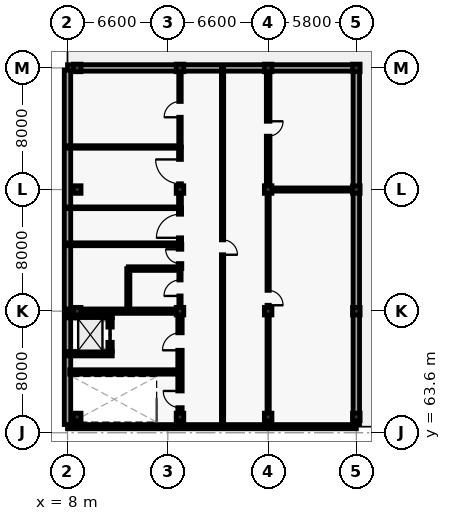
"""IFC4 building model, lengths in metres.
Left out: names, types, materials, properties, quantities, classifications, styles, units other than length and angle.
Written with IfcOpenShell. Run it as: python <this file> out.ifc"""

import sys

from ifc_helpers import new_model, si_unit, direction, frame, frame_2d, origin, origin_2d, place, context, subcontext, project, spatial, rectangle, extrude, element, fill, save


model = new_model("IFC4")
c1 = context("Model", 3, precision=1e-05, world=origin(), true_north=direction((0.0, 1.0)))
c2 = subcontext(c1, "Body", "Model", "MODEL_VIEW")
j1 = project(units=[si_unit("LENGTHUNIT", "METRE"), si_unit("PLANEANGLEUNIT", "RADIAN")], contexts=[c1])
p1 = place(None, origin())
s1 = spatial("IfcSite", under=j1, at=p1, CompositionType="ELEMENT")
p2 = place(p1, origin())
s2 = spatial("IfcBuilding", under=s1, at=p2, CompositionType="ELEMENT")
p3 = place(p2, frame((0.0, 0.0, 24.9)))
s3 = spatial("IfcBuildingStorey", under=s2, at=p3, CompositionType="ELEMENT", Elevation=24.9)
for number, where, z_axis, x_axis in (
    (1, (8.64, 64.64, 0.0), (0.0, 0.0, 1.0), (1.0, 0.0, 0.0)),
    (2, (8.64, 71.6, 0.0), (0.0, 0.0, 1.0), (1.0, 0.0, 0.0)),
    (3, (8.64, 79.6, 0.0), (0.0, 0.0, 1.0), (1.0, 0.0, 0.0)),
    (4, (8.64, 87.6, 0.0), (0.0, 0.0, 1.0), (1.0, 0.0, 0.0)),
    (5, (15.4, 64.64, 0.0), (0.0, 0.0, 1.0), (1.0, 0.0, 0.0)),
    (6, (15.4, 71.6, 0.0), (0.0, 0.0, 1.0), (1.0, 0.0, 0.0)),
    (7, (15.4, 79.6, 0.0), (0.0, 0.0, 1.0), (1.0, 0.0, 0.0)),
    (8, (15.4, 87.6, 0.0), (0.0, 0.0, 1.0), (1.0, 0.0, 0.0)),
    (9, (21.2, 64.64, 0.0), (0.0, 0.0, 1.0), (1.0, 0.0, 0.0)),
    (10, (21.2, 71.6, 0.0), (0.0, 0.0, 1.0), (1.0, 0.0, 0.0)),
    (11, (21.2, 79.6, 0.0), (0.0, 0.0, 1.0), (1.0, 0.0, 0.0)),
    (12, (21.2, 87.6, 0.0), (0.0, 0.0, 1.0), (1.0, 0.0, 0.0)),
    (13, (27.0, 64.64, 0.0), (0.0, 0.0, 1.0), (1.0, 0.0, 0.0)),
    (14, (27.0, 71.6, 0.0), (0.0, 0.0, 1.0), (1.0, 0.0, 0.0)),
    (15, (27.0, 79.6, 0.0), (0.0, 0.0, 1.0), (1.0, 0.0, 0.0)),
    (16, (27.0, 87.6, 0.0), (0.0, 0.0, 1.0), (1.0, 0.0, 0.0)),
):
    element("IfcColumn", number, at=place(p3, frame(where, z_axis=z_axis, x_axis=x_axis)), inside=s3, PredefinedType="COLUMN", context=c2, shape_type="SweptSolid", body=[
        extrude(rectangle(XDim=0.5, YDim=0.5, at=origin_2d()), origin(), (0.0, 0.0, 1.0), 4.5),
    ])
p4 = place(p3, frame((8.0, 87.6, 0.0), z_axis=(0.0, 0.0, 1.0), x_axis=(1.0, 0.0, 0.0)))
e17 = element("IfcWall", 17, at=p4, inside=s3, PredefinedType="SOLIDWALL", context=c2, shape_type="SweptSolid", body=[
    extrude(rectangle(XDim=19.0, YDim=0.425, at=frame_2d((9.5, 0.0))), origin(), (0.0, 0.0, 1.0), 3.605),
])
p5 = place(p3, frame((27.0, 87.46, 0.0), z_axis=(0.0, 0.0, 1.0), x_axis=(0.0, -1.0, 0.0)))
e18 = element("IfcWall", 18, at=p5, inside=s3, PredefinedType="SOLIDWALL", context=c2, shape_type="SweptSolid", body=[
    extrude(rectangle(XDim=23.32, YDim=0.425, at=frame_2d((11.66, 0.0))), origin(), (0.0, 0.0, 1.0), 3.405),
])
p6 = place(p3, frame((27.0, 64.0, 0.0), z_axis=(0.0, 0.0, 1.0), x_axis=(-1.0, 0.0, 0.0)))
e19 = element("IfcWall", 19, at=p6, inside=s3, PredefinedType="SOLIDWALL", context=c2, shape_type="SweptSolid", body=[
    extrude(rectangle(XDim=19.0, YDim=0.275, at=frame_2d((9.5, 0.0))), origin(), (0.0, 0.0, 1.0), 4.255),
])
p7 = place(p3, frame((8.0, 64.14, 0.0), z_axis=(0.0, 0.0, 1.0), x_axis=(0.0, 1.0, 0.0)))
e20 = element("IfcWall", 20, at=p7, inside=s3, PredefinedType="SOLIDWALL", context=c2, shape_type="SweptSolid", body=[
    extrude(rectangle(XDim=23.32, YDim=0.425, at=frame_2d((11.66, 0.0))), origin(), (0.0, 0.0, 1.0), 4.255),
])
p8 = place(p3, frame((7.855, 71.6, 0.0), z_axis=(0.0, 0.0, 1.0), x_axis=(1.0, 0.0, 0.0)))
e21 = element("IfcWall", 21, at=p8, inside=s3, PredefinedType="SHEAR", context=c2, shape_type="SweptSolid", body=[
    extrude(rectangle(XDim=7.293, YDim=0.29, at=frame_2d((3.646, 0.0))), origin(), (0.0, 0.0, 1.0), 4.255),
])
p9 = place(p3, frame((15.4, 64.145, 0.0), z_axis=(0.0, 0.0, 1.0), x_axis=(0.0, 1.0, 0.0)))
e22 = element("IfcWall", 22, at=p9, inside=s3, PredefinedType="SHEAR", context=c2, shape_type="SweptSolid", body=[
    extrude(rectangle(XDim=7.203, YDim=0.29, at=frame_2d((3.602, 0.0))), origin(), (0.0, 0.0, 1.0), 4.255),
])
p10 = place(p9, frame((1.105, 0.0, 0.0)))
e23 = element("IfcOpeningElement", 23, at=p10, cuts=e22, PredefinedType="OPENING", context=c2, shape_type="SweptSolid", body=[
    extrude(rectangle(XDim=1.1, YDim=2.15, at=frame_2d((0.55, 1.075))), frame((0.0, 0.155, 0.0), z_axis=(0.0, -1.0, 0.0), x_axis=(1.0, 0.0, 0.0)), (0.0, 0.0, 1.0), 0.31),
])
p11 = place(p9, frame((4.88, 0.0, 0.0)))
e24 = element("IfcOpeningElement", 24, at=p11, cuts=e22, PredefinedType="OPENING", context=c2, shape_type="SweptSolid", body=[
    extrude(rectangle(XDim=1.15, YDim=2.2, at=frame_2d((0.575, 1.1))), frame((0.0, 0.155, 0.0), z_axis=(0.0, -1.0, 0.0), x_axis=(1.0, 0.0, 0.0)), (0.0, 0.0, 1.0), 0.31),
])
p12 = place(p3, frame((8.145, 67.6, 0.0), z_axis=(0.0, 0.0, 1.0), x_axis=(1.0, 0.0, 0.0)))
e25 = element("IfcWall", 25, at=p12, inside=s3, PredefinedType="SHEAR", context=c2, shape_type="SweptSolid", body=[
    extrude(rectangle(XDim=7.11, YDim=0.29, at=frame_2d((3.555, 0.0))), origin(), (0.0, 0.0, 1.0), 4.255),
])
for number, where, z_axis, x_axis in (
    (26, (8.055, 68.8, 0.0), (0.0, 0.0, 1.0), (1.0, 0.0, 0.0)),
    (27, (8.055, 71.3, 0.0), (0.0, 0.0, 1.0), (1.0, 0.0, 0.0)),
):
    element("IfcWall", number, at=place(p3, frame(where, z_axis=z_axis, x_axis=x_axis)), inside=s3, PredefinedType="SHEAR", context=c2, shape_type="SweptSolid", body=[
        extrude(rectangle(XDim=2.89, YDim=0.29, at=frame_2d((1.445, 0.0))), origin(), (0.0, 0.0, 1.0), 4.255),
    ])
p13 = place(p3, frame((10.8, 68.945, 0.0), z_axis=(0.0, 0.0, 1.0), x_axis=(0.0, 1.0, 0.0)))
e28 = element("IfcWall", 28, at=p13, inside=s3, PredefinedType="SHEAR", context=c2, shape_type="SweptSolid", body=[
    extrude(rectangle(XDim=2.21, YDim=0.29, at=frame_2d((1.105, 0.0))), origin(), (0.0, 0.0, 1.0), 4.255),
])
p14 = place(p13, frame((0.605, 0.0, 0.0)))
e29 = element("IfcOpeningElement", 29, at=p14, cuts=e28, PredefinedType="OPENING", context=c2, shape_type="SweptSolid", body=[
    extrude(rectangle(XDim=1.0, YDim=2.15, at=frame_2d((0.5, 1.075))), frame((0.0, 0.155, 0.0), z_axis=(0.0, -1.0, 0.0), x_axis=(1.0, 0.0, 0.0)), (0.0, 0.0, 1.0), 0.31),
])
p15 = place(p3, frame((15.4, 71.852, 0.0), z_axis=(0.0, 0.0, 1.0), x_axis=(0.0, 1.0, 0.0)))
e30 = element("IfcWall", 30, at=p15, inside=s3, PredefinedType="PARTITIONING", context=c2, shape_type="SweptSolid", body=[
    extrude(rectangle(XDim=2.548, YDim=0.15, at=frame_2d((1.274, 0.0))), origin(), (0.0, 0.0, 1.0), 3.405),
])
p16 = place(p15, frame((0.749, 0.0, 0.0)))
e31 = element("IfcOpeningElement", 31, at=p16, cuts=e30, PredefinedType="OPENING", context=c2, shape_type="SweptSolid", body=[
    extrude(rectangle(XDim=1.05, YDim=2.15, at=frame_2d((0.525, 1.075))), frame((0.0, 0.085, 0.0), z_axis=(0.0, -1.0, 0.0), x_axis=(1.0, 0.0, 0.0)), (0.0, 0.0, 1.0), 0.17),
])
p17 = place(p3, frame((15.4, 74.4, 0.0), z_axis=(0.0, 0.0, 1.0), x_axis=(0.0, 1.0, 0.0)))
e32 = element("IfcWall", 32, at=p17, inside=s3, PredefinedType="PARTITIONING", context=c2, shape_type="SweptSolid", body=[
    extrude(rectangle(XDim=1.6, YDim=0.24, at=frame_2d((0.8, 0.0))), origin(), (0.0, 0.0, 1.0), 3.405),
])
p18 = place(p17, frame((0.33, 0.0, 0.0)))
e33 = element("IfcOpeningElement", 33, at=p18, cuts=e32, PredefinedType="OPENING", context=c2, shape_type="SweptSolid", body=[
    extrude(rectangle(XDim=0.94, YDim=2.15, at=frame_2d((0.47, 1.075))), frame((0.0, 0.13, 0.0), z_axis=(0.0, -1.0, 0.0), x_axis=(1.0, 0.0, 0.0)), (0.0, 0.0, 1.0), 0.26),
])
p19 = place(p3, frame((15.4, 76.0, 0.0), z_axis=(0.0, 0.0, 1.0), x_axis=(0.0, 1.0, 0.0)))
e34 = element("IfcWall", 34, at=p19, inside=s3, PredefinedType="PARTITIONING", context=c2, shape_type="SweptSolid", body=[
    extrude(rectangle(XDim=2.4, YDim=0.21, at=frame_2d((1.2, 0.0))), origin(), (0.0, 0.0, 1.0), 3.405),
])
p20 = place(p19, frame((0.425, 0.0, 0.0)))
e35 = element("IfcOpeningElement", 35, at=p20, cuts=e34, PredefinedType="OPENING", context=c2, shape_type="SweptSolid", body=[
    extrude(rectangle(XDim=1.55, YDim=2.25, at=frame_2d((0.775, 1.125))), frame((0.0, 0.115, 0.0), z_axis=(0.0, -1.0, 0.0), x_axis=(1.0, 0.0, 0.0)), (0.0, 0.0, 1.0), 0.23),
])
p21 = place(p3, frame((15.4, 78.4, 0.0), z_axis=(0.0, 0.0, 1.0), x_axis=(0.0, 1.0, 0.0)))
e36 = element("IfcWall", 36, at=p21, inside=s3, PredefinedType="PARTITIONING", context=c2, shape_type="SweptSolid", body=[
    extrude(rectangle(XDim=4.0, YDim=0.19, at=frame_2d((2.0, 0.0))), origin(), (0.0, 0.0, 1.0), 3.405),
])
p22 = place(p21, frame((1.58, 0.0, 0.0)))
e37 = element("IfcOpeningElement", 37, at=p22, cuts=e36, PredefinedType="OPENING", context=c2, shape_type="SweptSolid", body=[
    extrude(rectangle(XDim=1.6, YDim=2.3, at=frame_2d((0.8, 1.15))), frame((0.0, 0.105, 0.0), z_axis=(0.0, -1.0, 0.0), x_axis=(1.0, 0.0, 0.0)), (0.0, 0.0, 1.0), 0.21),
])
p23 = place(p3, frame((15.4, 82.4, 0.0), z_axis=(0.0, 0.0, 1.0), x_axis=(0.0, 1.0, 0.0)))
e38 = element("IfcWall", 38, at=p23, inside=s3, PredefinedType="PARTITIONING", context=c2, shape_type="SweptSolid", body=[
    extrude(rectangle(XDim=4.948, YDim=0.165, at=frame_2d((2.474, 0.0))), origin(), (0.0, 0.0, 1.0), 3.405),
])
p24 = place(p23, frame((1.954, 0.0, 0.0)))
e39 = element("IfcOpeningElement", 39, at=p24, cuts=e38, PredefinedType="OPENING", context=c2, shape_type="SweptSolid", body=[
    extrude(rectangle(XDim=1.04, YDim=2.2, at=frame_2d((0.52, 1.1))), frame((0.0, 0.093, 0.0), z_axis=(0.0, -1.0, 0.0), x_axis=(1.0, 0.0, 0.0)), (0.0, 0.0, 1.0), 0.185),
])
p25 = place(p3, frame((18.2, 87.6, 0.0), z_axis=(0.0, 0.0, 1.0), x_axis=(0.0, -1.0, 0.0)))
e40 = element("IfcWall", 40, at=p25, inside=s3, PredefinedType="PARTITIONING", context=c2, shape_type="SweptSolid", body=[
    extrude(rectangle(XDim=23.6, YDim=0.15, at=frame_2d((11.8, 0.0))), origin(), (0.0, 0.0, 1.0), 4.255),
])
p26 = place(p25, frame((11.31, 0.0, 0.0)))
e41 = element("IfcOpeningElement", 41, at=p26, cuts=e40, PredefinedType="OPENING", context=c2, shape_type="SweptSolid", body=[
    extrude(rectangle(XDim=0.98, YDim=2.1, at=frame_2d((0.49, 1.05))), frame((0.0, 0.085, 0.0), z_axis=(0.0, -1.0, 0.0), x_axis=(1.0, 0.0, 0.0)), (0.0, 0.0, 1.0), 0.17),
])
p27 = place(p3, frame((12.0, 74.4, 0.0), z_axis=(0.0, 0.0, 1.0), x_axis=(1.0, 0.0, 0.0)))
e42 = element("IfcWall", 42, at=p27, inside=s3, PredefinedType="PARTITIONING", context=c2, shape_type="SweptSolid", body=[
    extrude(rectangle(XDim=3.4, YDim=0.24, at=frame_2d((1.7, 0.0))), origin(), (0.0, 0.0, 1.0), 4.255),
])
p28 = place(p3, frame((12.0, 71.6, 0.0), z_axis=(0.0, 0.0, 1.0), x_axis=(0.0, 1.0, 0.0)))
e43 = element("IfcWall", 43, at=p28, inside=s3, PredefinedType="PARTITIONING", context=c2, shape_type="SweptSolid", body=[
    extrude(rectangle(XDim=2.8, YDim=0.21, at=frame_2d((1.4, 0.0))), origin(), (0.0, 0.0, 1.0), 4.255),
])
p29 = place(p3, frame((8.0, 76.0, 0.0), z_axis=(0.0, 0.0, 1.0), x_axis=(1.0, 0.0, 0.0)))
e44 = element("IfcWall", 44, at=p29, inside=s3, PredefinedType="PARTITIONING", context=c2, shape_type="SweptSolid", body=[
    extrude(rectangle(XDim=7.4, YDim=0.19, at=frame_2d((3.7, 0.0))), origin(), (0.0, 0.0, 1.0), 4.255),
])
p30 = place(p3, frame((8.0, 78.4, 0.0), z_axis=(0.0, 0.0, 1.0), x_axis=(1.0, 0.0, 0.0)))
e45 = element("IfcWall", 45, at=p30, inside=s3, PredefinedType="PARTITIONING", context=c2, shape_type="SweptSolid", body=[
    extrude(rectangle(XDim=7.4, YDim=0.115, at=frame_2d((3.7, 0.0))), origin(), (0.0, 0.0, 1.0), 4.255),
])
p31 = place(p3, frame((8.0, 82.4, 0.0), z_axis=(0.0, 0.0, 1.0), x_axis=(1.0, 0.0, 0.0)))
e46 = element("IfcWall", 46, at=p31, inside=s3, PredefinedType="PARTITIONING", context=c2, shape_type="SweptSolid", body=[
    extrude(rectangle(XDim=7.4, YDim=0.165, at=frame_2d((3.7, 0.0))), origin(), (0.0, 0.0, 1.0), 4.255),
])
p32 = place(p3, frame((21.2, 79.348, 0.0), z_axis=(0.0, 0.0, 1.0), x_axis=(0.0, -1.0, 0.0)))
e47 = element("IfcWall", 47, at=p32, inside=s3, PredefinedType="PARTITIONING", context=c2, shape_type="SweptSolid", body=[
    extrude(rectangle(XDim=15.348, YDim=0.15, at=frame_2d((7.674, 0.0))), origin(), (0.0, 0.0, 1.0), 3.405),
])
p33 = place(p32, frame((6.38, 0.0, 0.0)))
e48 = element("IfcOpeningElement", 48, at=p33, cuts=e47, PredefinedType="OPENING", context=c2, shape_type="SweptSolid", body=[
    extrude(rectangle(XDim=0.98, YDim=2.1, at=frame_2d((0.49, 1.05))), frame((0.0, 0.085, 0.0), z_axis=(0.0, -1.0, 0.0), x_axis=(1.0, 0.0, 0.0)), (0.0, 0.0, 1.0), 0.17),
])
p34 = place(p3, frame((21.2, 87.348, 0.0), z_axis=(0.0, 0.0, 1.0), x_axis=(0.0, -1.0, 0.0)))
e49 = element("IfcWall", 49, at=p34, inside=s3, PredefinedType="PARTITIONING", context=c2, shape_type="SweptSolid", body=[
    extrude(rectangle(XDim=7.496, YDim=0.24, at=frame_2d((3.748, 0.0))), origin(), (0.0, 0.0, 1.0), 3.405),
])
p35 = place(p34, frame((3.258, 0.0, 0.0)))
e50 = element("IfcOpeningElement", 50, at=p35, cuts=e49, PredefinedType="OPENING", context=c2, shape_type="SweptSolid", body=[
    extrude(rectangle(XDim=0.98, YDim=2.1, at=frame_2d((0.49, 1.05))), frame((0.0, 0.13, 0.0), z_axis=(0.0, -1.0, 0.0), x_axis=(1.0, 0.0, 0.0)), (0.0, 0.0, 1.0), 0.26),
])
p36 = place(p3, frame((21.452, 79.6, 0.0), z_axis=(0.0, 0.0, 1.0), x_axis=(1.0, 0.0, 0.0)))
e51 = element("IfcWall", 51, at=p36, inside=s3, PredefinedType="PARTITIONING", context=c2, shape_type="SweptSolid", body=[
    extrude(rectangle(XDim=5.296, YDim=0.21, at=frame_2d((2.648, 0.0))), origin(), (0.0, 0.0, 1.0), 3.605),
])
p37 = place(p10, origin())
e52 = element("IfcDoor", 52, at=p37, inside=s3, OperationType="SINGLE_SWING_RIGHT", PredefinedType="DOOR", context=c2, shape_type="SweptSolid", body=[
    extrude(rectangle(XDim=1.1, YDim=2.15, at=frame_2d((0.55, 1.075))), frame((0.0, 0.025, 0.0), z_axis=(0.0, -1.0, 0.0), x_axis=(1.0, 0.0, 0.0)), (0.0, 0.0, 1.0), 0.05),
])
fill(e23, e52)
p38 = place(p11, origin())
e53 = element("IfcDoor", 53, at=p38, inside=s3, OperationType="SINGLE_SWING_LEFT", PredefinedType="DOOR", context=c2, shape_type="SweptSolid", body=[
    extrude(rectangle(XDim=1.15, YDim=2.2, at=frame_2d((0.575, 1.1))), frame((0.0, 0.025, 0.0), z_axis=(0.0, -1.0, 0.0), x_axis=(1.0, 0.0, 0.0)), (0.0, 0.0, 1.0), 0.05),
])
fill(e24, e53)
p39 = place(p14, origin())
e54 = element("IfcDoor", 54, at=p39, inside=s3, OperationType="SLIDING_TO_LEFT", PredefinedType="DOOR", context=c2, shape_type="SweptSolid", body=[
    extrude(rectangle(XDim=1.0, YDim=2.15, at=frame_2d((0.5, 1.075))), frame((0.0, 0.025, 0.0), z_axis=(0.0, -1.0, 0.0), x_axis=(1.0, 0.0, 0.0)), (0.0, 0.0, 1.0), 0.05),
])
fill(e29, e54)
p40 = place(p16, origin())
e55 = element("IfcDoor", 55, at=p40, inside=s3, OperationType="SINGLE_SWING_LEFT", PredefinedType="DOOR", context=c2, shape_type="SweptSolid", body=[
    extrude(rectangle(XDim=1.05, YDim=2.15, at=frame_2d((0.525, 1.075))), frame((0.0, 0.025, 0.0), z_axis=(0.0, -1.0, 0.0), x_axis=(1.0, 0.0, 0.0)), (0.0, 0.0, 1.0), 0.05),
])
fill(e31, e55)
p41 = place(p18, origin())
e56 = element("IfcDoor", 56, at=p41, inside=s3, OperationType="SINGLE_SWING_RIGHT", PredefinedType="DOOR", context=c2, shape_type="SweptSolid", body=[
    extrude(rectangle(XDim=0.94, YDim=2.15, at=frame_2d((0.47, 1.075))), frame((0.0, 0.025, 0.0), z_axis=(0.0, -1.0, 0.0), x_axis=(1.0, 0.0, 0.0)), (0.0, 0.0, 1.0), 0.05),
])
fill(e33, e56)
p42 = place(p20, origin())
e57 = element("IfcDoor", 57, at=p42, inside=s3, OperationType="SINGLE_SWING_LEFT", PredefinedType="DOOR", context=c2, shape_type="SweptSolid", body=[
    extrude(rectangle(XDim=1.55, YDim=2.25, at=frame_2d((0.775, 1.125))), frame((0.0, 0.025, 0.0), z_axis=(0.0, -1.0, 0.0), x_axis=(1.0, 0.0, 0.0)), (0.0, 0.0, 1.0), 0.05),
])
fill(e35, e57)
p43 = place(p22, origin())
e58 = element("IfcDoor", 58, at=p43, inside=s3, OperationType="SINGLE_SWING_RIGHT", PredefinedType="DOOR", context=c2, shape_type="SweptSolid", body=[
    extrude(rectangle(XDim=1.6, YDim=2.3, at=frame_2d((0.8, 1.15))), frame((0.0, 0.025, 0.0), z_axis=(0.0, -1.0, 0.0), x_axis=(1.0, 0.0, 0.0)), (0.0, 0.0, 1.0), 0.05),
])
fill(e37, e58)
p44 = place(p24, origin())
e59 = element("IfcDoor", 59, at=p44, inside=s3, OperationType="SINGLE_SWING_LEFT", PredefinedType="DOOR", context=c2, shape_type="SweptSolid", body=[
    extrude(rectangle(XDim=1.04, YDim=2.2, at=frame_2d((0.52, 1.1))), frame((0.0, 0.025, 0.0), z_axis=(0.0, -1.0, 0.0), x_axis=(1.0, 0.0, 0.0)), (0.0, 0.0, 1.0), 0.05),
])
fill(e39, e59)
p45 = place(p26, origin())
e60 = element("IfcDoor", 60, at=p45, inside=s3, OperationType="SINGLE_SWING_RIGHT", PredefinedType="DOOR", context=c2, shape_type="SweptSolid", body=[
    extrude(rectangle(XDim=0.98, YDim=2.1, at=frame_2d((0.49, 1.05))), frame((0.0, 0.025, 0.0), z_axis=(0.0, -1.0, 0.0), x_axis=(1.0, 0.0, 0.0)), (0.0, 0.0, 1.0), 0.05),
])
fill(e41, e60)
p46 = place(p33, origin())
e61 = element("IfcDoor", 61, at=p46, inside=s3, OperationType="SINGLE_SWING_RIGHT", PredefinedType="DOOR", context=c2, shape_type="SweptSolid", body=[
    extrude(rectangle(XDim=0.98, YDim=2.1, at=frame_2d((0.49, 1.05))), frame((0.0, 0.025, 0.0), z_axis=(0.0, -1.0, 0.0), x_axis=(1.0, 0.0, 0.0)), (0.0, 0.0, 1.0), 0.05),
])
fill(e48, e61)
p47 = place(p35, origin())
e62 = element("IfcDoor", 62, at=p47, inside=s3, OperationType="SINGLE_SWING_LEFT", PredefinedType="DOOR", context=c2, shape_type="SweptSolid", body=[
    extrude(rectangle(XDim=0.98, YDim=2.1, at=frame_2d((0.49, 1.05))), frame((0.0, 0.025, 0.0), z_axis=(0.0, -1.0, 0.0), x_axis=(1.0, 0.0, 0.0)), (0.0, 0.0, 1.0), 0.05),
])
fill(e50, e62)
save(model, sys.argv[1])
